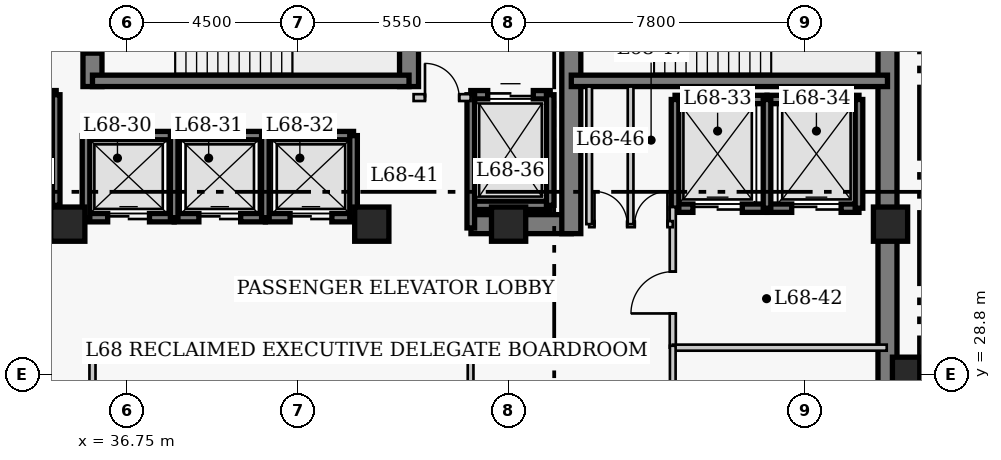
"""IFC4 building model, lengths in metres.
Left out: names, types, materials, properties, quantities, classifications, styles, units other than length and angle.
Written with IfcOpenShell. Run it as: python <this file> out.ifc"""

import sys

from ifc_helpers import new_model, si_unit, direction, frame, frame_2d, origin, origin_2d, place, context, subcontext, project, spatial, rectangle, extrude, element, fill, save


model = new_model("IFC4")
c1 = context("Model", 3, precision=1e-05, world=origin(), true_north=direction((0.0, 1.0)))
c2 = subcontext(c1, "Body", "Model", "MODEL_VIEW")
j1 = project(units=[si_unit("LENGTHUNIT", "METRE"), si_unit("PLANEANGLEUNIT", "RADIAN")], contexts=[c1])
p1 = place(None, origin())
s1 = spatial("IfcSite", under=j1, at=p1, CompositionType="ELEMENT")
p2 = place(p1, origin())
s2 = spatial("IfcBuilding", under=s1, at=p2, CompositionType="ELEMENT")
p3 = place(p2, frame((0.0, 0.0, 273.4)))
s3 = spatial("IfcBuildingStorey", under=s2, at=p3, CompositionType="ELEMENT", Elevation=273.4)
p4 = place(p3, frame((56.77, 27.05, 0.0), z_axis=(0.0, 0.0, 1.0), x_axis=(0.0, 1.0, 0.0)))
e1 = element("IfcWall", 1, at=p4, inside=s3, PredefinedType="SHEAR", context=c2, shape_type="SweptSolid", body=[
    extrude(rectangle(XDim=13.52, YDim=0.5, at=frame_2d((6.76, 0.0))), origin(), (0.0, 0.0, 1.0), 4.0),
])
p5 = place(p3, frame((45.81, 32.75, 0.0), z_axis=(0.0, 0.0, 1.0), x_axis=(1.0, 0.0, 0.0)))
e2 = element("IfcWall", 2, at=p5, inside=s3, PredefinedType="SHEAR", context=c2, shape_type="SweptSolid", body=[
    extrude(rectangle(XDim=2.64, YDim=0.5, at=frame_2d((1.32, 0.0))), origin(), (0.0, 0.0, 1.0), 4.0),
])
p6 = place(p3, frame((35.85, 36.37, 0.0), z_axis=(0.0, 0.0, 1.0), x_axis=(0.0, 1.0, 0.0)))
e3 = element("IfcWall", 3, at=p6, inside=s3, PredefinedType="SHEAR", context=c2, shape_type="SweptSolid", body=[
    extrude(rectangle(XDim=3.95, YDim=0.5, at=frame_2d((1.975, 0.0))), origin(), (0.0, 0.0, 1.0), 4.0),
])
p7 = place(p6, frame((0.88, 0.0, 0.0)))
e4 = element("IfcOpeningElement", 4, at=p7, cuts=e3, PredefinedType="OPENING", context=c2, shape_type="SweptSolid", body=[
    extrude(rectangle(XDim=1.1, YDim=2.15, at=frame_2d((0.55, 1.075))), frame((0.0, 0.26, 0.0), z_axis=(0.0, -1.0, 0.0), x_axis=(1.0, 0.0, 0.0)), (0.0, 0.0, 1.0), 0.52),
])
p8 = place(p3, frame((44.18, 36.37, 0.0), z_axis=(0.0, 0.0, 1.0), x_axis=(0.0, 1.0, 0.0)))
e5 = element("IfcWall", 5, at=p8, inside=s3, PredefinedType="SHEAR", context=c2, shape_type="SweptSolid", body=[
    extrude(rectangle(XDim=3.95, YDim=0.5, at=frame_2d((1.975, 0.0))), origin(), (0.0, 0.0, 1.0), 4.0),
])
p9 = place(p3, frame((48.45, 32.5, 0.0), z_axis=(0.0, 0.0, 1.0), x_axis=(0.0, 1.0, 0.0)))
e6 = element("IfcWall", 6, at=p9, inside=s3, PredefinedType="SHEAR", context=c2, shape_type="SweptSolid", body=[
    extrude(rectangle(XDim=7.82, YDim=0.5, at=frame_2d((3.91, 0.0))), origin(), (0.0, 0.0, 1.0), 4.0),
])
p10 = place(p9, frame((5.7, 0.0, 0.0)))
e7 = element("IfcOpeningElement", 7, at=p10, cuts=e6, PredefinedType="OPENING", context=c2, shape_type="SweptSolid", body=[
    extrude(rectangle(XDim=1.1, YDim=2.15, at=frame_2d((0.55, 1.075))), frame((0.0, 0.26, 0.0), z_axis=(0.0, -1.0, 0.0), x_axis=(1.0, 0.0, 0.0)), (0.0, 0.0, 1.0), 0.52),
])
p11 = place(p3, frame((35.85, 36.52, 0.0), z_axis=(0.0, 0.0, 1.0), x_axis=(1.0, 0.0, 0.0)))
e8 = element("IfcWall", 8, at=p11, inside=s3, PredefinedType="SHEAR", context=c2, shape_type="SweptSolid", body=[
    extrude(rectangle(XDim=8.33, YDim=0.3, at=frame_2d((4.165, 0.0))), origin(), (0.0, 0.0, 1.0), 4.0),
])
p12 = place(p3, frame((48.45, 36.52, 0.0), z_axis=(0.0, 0.0, 1.0), x_axis=(1.0, 0.0, 0.0)))
e9 = element("IfcWall", 9, at=p12, inside=s3, PredefinedType="SHEAR", context=c2, shape_type="SweptSolid", body=[
    extrude(rectangle(XDim=8.32, YDim=0.3, at=frame_2d((4.16, 0.0))), origin(), (0.0, 0.0, 1.0), 4.0),
])
for number, where, z_axis, x_axis in (
    (10, (57.35, 28.8, 0.0), (0.0, 0.0, 1.0), (1.0, 0.0, 0.0)),
    (11, (35.2, 32.75, 0.0), (0.0, 0.0, 1.0), (1.0, 0.0, 0.0)),
    (12, (43.2, 32.75, 0.0), (0.0, 0.0, 1.0), (1.0, 0.0, 0.0)),
    (13, (46.8, 32.75, 0.0), (0.0, 0.0, 1.0), (1.0, 0.0, 0.0)),
    (14, (56.85, 32.75, 0.0), (0.0, 0.0, 1.0), (1.0, 0.0, 0.0)),
):
    element("IfcColumn", number, at=place(p3, frame(where, z_axis=z_axis, x_axis=x_axis)), inside=s3, PredefinedType="COLUMN", context=c2, shape_type="SweptSolid", body=[
        extrude(rectangle(XDim=0.9, YDim=0.9, at=origin_2d()), origin(), (0.0, 0.0, 1.0), 4.0),
    ])
p13 = place(p3, frame((35.68, 35.08, 0.0), z_axis=(0.0, 0.0, 1.0), x_axis=(1.0, 0.0, 0.0)))
e15 = element("IfcWall", 15, at=p13, inside=s3, PredefinedType="SHEAR", context=c2, shape_type="SweptSolid", body=[
    extrude(rectangle(XDim=2.32, YDim=0.22, at=frame_2d((1.16, 0.0))), origin(), (0.0, 0.0, 1.0), 4.0),
])
p14 = place(p3, frame((35.68, 32.92, 0.0), z_axis=(0.0, 0.0, 1.0), x_axis=(1.0, 0.0, 0.0)))
e16 = element("IfcWall", 16, at=p14, inside=s3, PredefinedType="SHEAR", context=c2, shape_type="SweptSolid", body=[
    extrude(rectangle(XDim=2.32, YDim=0.22, at=frame_2d((1.16, 0.0))), origin(), (0.0, 0.0, 1.0), 4.0),
])
p15 = place(p14, frame((0.57, 0.0, 0.0)))
e17 = element("IfcOpeningElement", 17, at=p15, cuts=e16, PredefinedType="OPENING", context=c2, shape_type="SweptSolid", body=[
    extrude(rectangle(XDim=1.1, YDim=2.15, at=frame_2d((0.55, 1.075))), frame((0.0, 0.12, 0.0), z_axis=(0.0, -1.0, 0.0), x_axis=(1.0, 0.0, 0.0)), (0.0, 0.0, 1.0), 0.24),
])
p16 = place(p3, frame((35.68, 32.92, 0.0), z_axis=(0.0, 0.0, 1.0), x_axis=(0.0, 1.0, 0.0)))
e18 = element("IfcWall", 18, at=p16, inside=s3, PredefinedType="SHEAR", context=c2, shape_type="SweptSolid", body=[
    extrude(rectangle(XDim=2.16, YDim=0.2, at=frame_2d((1.08, 0.0))), origin(), (0.0, 0.0, 1.0), 4.0),
])
p17 = place(p3, frame((38.0, 35.08, 0.0), z_axis=(0.0, 0.0, 1.0), x_axis=(1.0, 0.0, 0.0)))
e19 = element("IfcWall", 19, at=p17, inside=s3, PredefinedType="SHEAR", context=c2, shape_type="SweptSolid", body=[
    extrude(rectangle(XDim=2.4, YDim=0.22, at=frame_2d((1.2, 0.0))), origin(), (0.0, 0.0, 1.0), 4.0),
])
p18 = place(p3, frame((38.0, 32.92, 0.0), z_axis=(0.0, 0.0, 1.0), x_axis=(1.0, 0.0, 0.0)))
e20 = element("IfcWall", 20, at=p18, inside=s3, PredefinedType="SHEAR", context=c2, shape_type="SweptSolid", body=[
    extrude(rectangle(XDim=2.4, YDim=0.22, at=frame_2d((1.2, 0.0))), origin(), (0.0, 0.0, 1.0), 4.0),
])
p19 = place(p18, frame((0.65, 0.0, 0.0)))
e21 = element("IfcOpeningElement", 21, at=p19, cuts=e20, PredefinedType="OPENING", context=c2, shape_type="SweptSolid", body=[
    extrude(rectangle(XDim=1.1, YDim=2.15, at=frame_2d((0.55, 1.075))), frame((0.0, 0.12, 0.0), z_axis=(0.0, -1.0, 0.0), x_axis=(1.0, 0.0, 0.0)), (0.0, 0.0, 1.0), 0.24),
])
p20 = place(p3, frame((38.0, 32.92, 0.0), z_axis=(0.0, 0.0, 1.0), x_axis=(0.0, 1.0, 0.0)))
e22 = element("IfcWall", 22, at=p20, inside=s3, PredefinedType="SHEAR", context=c2, shape_type="SweptSolid", body=[
    extrude(rectangle(XDim=2.16, YDim=0.2, at=frame_2d((1.08, 0.0))), origin(), (0.0, 0.0, 1.0), 4.0),
])
p21 = place(p3, frame((40.4, 35.08, 0.0), z_axis=(0.0, 0.0, 1.0), x_axis=(1.0, 0.0, 0.0)))
e23 = element("IfcWall", 23, at=p21, inside=s3, PredefinedType="SHEAR", context=c2, shape_type="SweptSolid", body=[
    extrude(rectangle(XDim=2.32, YDim=0.22, at=frame_2d((1.16, 0.0))), origin(), (0.0, 0.0, 1.0), 4.0),
])
p22 = place(p3, frame((40.4, 32.92, 0.0), z_axis=(0.0, 0.0, 1.0), x_axis=(1.0, 0.0, 0.0)))
e24 = element("IfcWall", 24, at=p22, inside=s3, PredefinedType="SHEAR", context=c2, shape_type="SweptSolid", body=[
    extrude(rectangle(XDim=2.32, YDim=0.22, at=frame_2d((1.16, 0.0))), origin(), (0.0, 0.0, 1.0), 4.0),
])
p23 = place(p22, frame((0.65, 0.0, 0.0)))
e25 = element("IfcOpeningElement", 25, at=p23, cuts=e24, PredefinedType="OPENING", context=c2, shape_type="SweptSolid", body=[
    extrude(rectangle(XDim=1.1, YDim=2.15, at=frame_2d((0.55, 1.075))), frame((0.0, 0.12, 0.0), z_axis=(0.0, -1.0, 0.0), x_axis=(1.0, 0.0, 0.0)), (0.0, 0.0, 1.0), 0.24),
])
for number, where, z_axis, x_axis in (
    (26, (40.4, 32.92, 0.0), (0.0, 0.0, 1.0), (0.0, 1.0, 0.0)),
    (27, (42.72, 32.92, 0.0), (0.0, 0.0, 1.0), (0.0, 1.0, 0.0)),
):
    element("IfcWall", number, at=place(p3, frame(where, z_axis=z_axis, x_axis=x_axis)), inside=s3, PredefinedType="SHEAR", context=c2, shape_type="SweptSolid", body=[
        extrude(rectangle(XDim=2.16, YDim=0.2, at=frame_2d((1.08, 0.0))), origin(), (0.0, 0.0, 1.0), 4.0),
    ])
p24 = place(p3, frame((51.18, 36.03, 0.0), z_axis=(0.0, 0.0, 1.0), x_axis=(1.0, 0.0, 0.0)))
e28 = element("IfcWall", 28, at=p24, inside=s3, PredefinedType="SHEAR", context=c2, shape_type="SweptSolid", body=[
    extrude(rectangle(XDim=2.42, YDim=0.22, at=frame_2d((1.21, 0.0))), origin(), (0.0, 0.0, 1.0), 4.0),
])
p25 = place(p3, frame((51.18, 33.17, 0.0), z_axis=(0.0, 0.0, 1.0), x_axis=(1.0, 0.0, 0.0)))
e29 = element("IfcWall", 29, at=p25, inside=s3, PredefinedType="SHEAR", context=c2, shape_type="SweptSolid", body=[
    extrude(rectangle(XDim=2.42, YDim=0.22, at=frame_2d((1.21, 0.0))), origin(), (0.0, 0.0, 1.0), 4.0),
])
p26 = place(p25, frame((0.47, 0.0, 0.0)))
e30 = element("IfcOpeningElement", 30, at=p26, cuts=e29, PredefinedType="OPENING", context=c2, shape_type="SweptSolid", body=[
    extrude(rectangle(XDim=1.3, YDim=2.15, at=frame_2d((0.65, 1.075))), frame((0.0, 0.12, 0.0), z_axis=(0.0, -1.0, 0.0), x_axis=(1.0, 0.0, 0.0)), (0.0, 0.0, 1.0), 0.24),
])
p27 = place(p3, frame((51.18, 33.17, 0.0), z_axis=(0.0, 0.0, 1.0), x_axis=(0.0, 1.0, 0.0)))
e31 = element("IfcWall", 31, at=p27, inside=s3, PredefinedType="SHEAR", context=c2, shape_type="SweptSolid", body=[
    extrude(rectangle(XDim=2.86, YDim=0.2, at=frame_2d((1.43, 0.0))), origin(), (0.0, 0.0, 1.0), 4.0),
])
p28 = place(p3, frame((53.6, 36.03, 0.0), z_axis=(0.0, 0.0, 1.0), x_axis=(1.0, 0.0, 0.0)))
e32 = element("IfcWall", 32, at=p28, inside=s3, PredefinedType="SHEAR", context=c2, shape_type="SweptSolid", body=[
    extrude(rectangle(XDim=2.42, YDim=0.22, at=frame_2d((1.21, 0.0))), origin(), (0.0, 0.0, 1.0), 4.0),
])
p29 = place(p3, frame((53.6, 33.17, 0.0), z_axis=(0.0, 0.0, 1.0), x_axis=(1.0, 0.0, 0.0)))
e33 = element("IfcWall", 33, at=p29, inside=s3, PredefinedType="SHEAR", context=c2, shape_type="SweptSolid", body=[
    extrude(rectangle(XDim=2.42, YDim=0.22, at=frame_2d((1.21, 0.0))), origin(), (0.0, 0.0, 1.0), 4.0),
])
p30 = place(p29, frame((0.65, 0.0, 0.0)))
e34 = element("IfcOpeningElement", 34, at=p30, cuts=e33, PredefinedType="OPENING", context=c2, shape_type="SweptSolid", body=[
    extrude(rectangle(XDim=1.3, YDim=2.15, at=frame_2d((0.65, 1.075))), frame((0.0, 0.12, 0.0), z_axis=(0.0, -1.0, 0.0), x_axis=(1.0, 0.0, 0.0)), (0.0, 0.0, 1.0), 0.24),
])
for number, where, z_axis, x_axis in (
    (35, (53.6, 33.17, 0.0), (0.0, 0.0, 1.0), (0.0, 1.0, 0.0)),
    (36, (56.02, 33.17, 0.0), (0.0, 0.0, 1.0), (0.0, 1.0, 0.0)),
):
    element("IfcWall", number, at=place(p3, frame(where, z_axis=z_axis, x_axis=x_axis)), inside=s3, PredefinedType="SHEAR", context=c2, shape_type="SweptSolid", body=[
        extrude(rectangle(XDim=2.86, YDim=0.2, at=frame_2d((1.43, 0.0))), origin(), (0.0, 0.0, 1.0), 4.0),
    ])
p31 = place(p3, frame((32.805, 36.155, 0.0), z_axis=(0.0, 0.0, 1.0), x_axis=(1.0, 0.0, 0.0)))
e37 = element("IfcWall", 37, at=p31, inside=s3, PredefinedType="SHEAR", context=c2, shape_type="SweptSolid", body=[
    extrude(rectangle(XDim=2.09, YDim=0.22, at=frame_2d((1.045, 0.0))), origin(), (0.0, 0.0, 1.0), 4.0),
])
p32 = place(p31, frame((0.445, 0.0, 0.0)))
e38 = element("IfcOpeningElement", 38, at=p32, cuts=e37, PredefinedType="OPENING", context=c2, shape_type="SweptSolid", body=[
    extrude(rectangle(XDim=1.2, YDim=2.15, at=frame_2d((0.6, 1.075))), frame((0.0, 0.12, 0.0), z_axis=(0.0, -1.0, 0.0), x_axis=(1.0, 0.0, 0.0)), (0.0, 0.0, 1.0), 0.24),
])
p33 = place(p3, frame((32.805, 33.245, 0.0), z_axis=(0.0, 0.0, 1.0), x_axis=(1.0, 0.0, 0.0)))
e39 = element("IfcWall", 39, at=p33, inside=s3, PredefinedType="SHEAR", context=c2, shape_type="SweptSolid", body=[
    extrude(rectangle(XDim=2.09, YDim=0.22, at=frame_2d((1.045, 0.0))), origin(), (0.0, 0.0, 1.0), 4.0),
])
p34 = place(p3, frame((34.895, 33.245, 0.0), z_axis=(0.0, 0.0, 1.0), x_axis=(0.0, 1.0, 0.0)))
e40 = element("IfcWall", 40, at=p34, inside=s3, PredefinedType="SHEAR", context=c2, shape_type="SweptSolid", body=[
    extrude(rectangle(XDim=2.91, YDim=0.2, at=frame_2d((1.455, 0.0))), origin(), (0.0, 0.0, 1.0), 4.0),
])
p35 = place(p3, frame((45.805, 36.155, 0.0), z_axis=(0.0, 0.0, 1.0), x_axis=(1.0, 0.0, 0.0)))
e41 = element("IfcWall", 41, at=p35, inside=s3, PredefinedType="SHEAR", context=c2, shape_type="SweptSolid", body=[
    extrude(rectangle(XDim=2.09, YDim=0.22, at=frame_2d((1.045, 0.0))), origin(), (0.0, 0.0, 1.0), 4.0),
])
p36 = place(p35, frame((0.445, 0.0, 0.0)))
e42 = element("IfcOpeningElement", 42, at=p36, cuts=e41, PredefinedType="OPENING", context=c2, shape_type="SweptSolid", body=[
    extrude(rectangle(XDim=1.2, YDim=2.15, at=frame_2d((0.6, 1.075))), frame((0.0, 0.12, 0.0), z_axis=(0.0, -1.0, 0.0), x_axis=(1.0, 0.0, 0.0)), (0.0, 0.0, 1.0), 0.24),
])
p37 = place(p3, frame((45.805, 33.245, 0.0), z_axis=(0.0, 0.0, 1.0), x_axis=(1.0, 0.0, 0.0)))
e43 = element("IfcWall", 43, at=p37, inside=s3, PredefinedType="SHEAR", context=c2, shape_type="SweptSolid", body=[
    extrude(rectangle(XDim=2.09, YDim=0.22, at=frame_2d((1.045, 0.0))), origin(), (0.0, 0.0, 1.0), 4.0),
])
p38 = place(p3, frame((45.805, 32.65, 0.0), z_axis=(0.0, 0.0, 1.0), x_axis=(0.0, 1.0, 0.0)))
e44 = element("IfcWall", 44, at=p38, inside=s3, PredefinedType="SHEAR", context=c2, shape_type="SweptSolid", body=[
    extrude(rectangle(XDim=3.505, YDim=0.2, at=frame_2d((1.752, 0.0))), origin(), (0.0, 0.0, 1.0), 4.0),
])
p39 = place(p3, frame((47.895, 33.245, 0.0), z_axis=(0.0, 0.0, 1.0), x_axis=(0.0, 1.0, 0.0)))
e45 = element("IfcWall", 45, at=p39, inside=s3, PredefinedType="SHEAR", context=c2, shape_type="SweptSolid", body=[
    extrude(rectangle(XDim=2.91, YDim=0.2, at=frame_2d((1.455, 0.0))), origin(), (0.0, 0.0, 1.0), 4.0),
])
p40 = place(p3, frame((44.3, 36.08, 0.0), z_axis=(0.0, 0.0, 1.0), x_axis=(1.0, 0.0, 0.0)))
e46 = element("IfcWall", 46, at=p40, inside=s3, PredefinedType="PARTITIONING", context=c2, shape_type="SweptSolid", body=[
    extrude(rectangle(XDim=1.5, YDim=0.18, at=frame_2d((0.75, 0.0))), origin(), (0.0, 0.0, 1.0), 3.76),
])
p41 = place(p40, frame((0.3, 0.0, 0.0)))
e47 = element("IfcOpeningElement", 47, at=p41, cuts=e46, PredefinedType="OPENING", context=c2, shape_type="SweptSolid", body=[
    extrude(rectangle(XDim=0.9, YDim=2.15, at=frame_2d((0.45, 1.075))), frame((0.0, 0.1, 0.0), z_axis=(0.0, -1.0, 0.0), x_axis=(1.0, 0.0, 0.0)), (0.0, 0.0, 1.0), 0.2),
])
p42 = place(p3, frame((51.12, 29.5, 0.0), z_axis=(0.0, 0.0, 1.0), x_axis=(0.0, 1.0, 0.0)))
e48 = element("IfcWall", 48, at=p42, inside=s3, PredefinedType="PARTITIONING", context=c2, shape_type="SweptSolid", body=[
    extrude(rectangle(XDim=3.7, YDim=0.16, at=frame_2d((1.85, 0.0))), origin(), (0.0, 0.0, 1.0), 3.76),
])
p43 = place(p42, frame((0.9, 0.0, 0.0)))
e49 = element("IfcOpeningElement", 49, at=p43, cuts=e48, PredefinedType="OPENING", context=c2, shape_type="SweptSolid", body=[
    extrude(rectangle(XDim=1.1, YDim=2.15, at=frame_2d((0.55, 1.075))), frame((0.0, 0.09, 0.0), z_axis=(0.0, -1.0, 0.0), x_axis=(1.0, 0.0, 0.0)), (0.0, 0.0, 1.0), 0.18),
])
p44 = place(p3, frame((51.12, 29.5, 0.0), z_axis=(0.0, 0.0, 1.0), x_axis=(1.0, 0.0, 0.0)))
e50 = element("IfcWall", 50, at=p44, inside=s3, PredefinedType="PARTITIONING", context=c2, shape_type="SweptSolid", body=[
    extrude(rectangle(XDim=5.63, YDim=0.16, at=frame_2d((2.815, 0.0))), origin(), (0.0, 0.0, 1.0), 3.76),
])
p45 = place(p3, frame((48.92, 32.75, 0.0), z_axis=(0.0, 0.0, 1.0), x_axis=(1.0, 0.0, 0.0)))
e51 = element("IfcWall", 51, at=p45, inside=s3, PredefinedType="PARTITIONING", context=c2, shape_type="SweptSolid", body=[
    extrude(rectangle(XDim=2.2, YDim=0.16, at=frame_2d((1.1, 0.0))), origin(), (0.0, 0.0, 1.0), 3.76),
])
p46 = place(p45, frame((0.14, 0.0, 0.0)))
e52 = element("IfcOpeningElement", 52, at=p46, cuts=e51, PredefinedType="OPENING", context=c2, shape_type="SweptSolid", body=[
    extrude(rectangle(XDim=0.86, YDim=2.05, at=frame_2d((0.43, 1.025))), frame((0.0, 0.09, 0.0), z_axis=(0.0, -1.0, 0.0), x_axis=(1.0, 0.0, 0.0)), (0.0, 0.0, 1.0), 0.18),
])
p47 = place(p45, frame((1.2, 0.0, 0.0)))
e53 = element("IfcOpeningElement", 53, at=p47, cuts=e51, PredefinedType="OPENING", context=c2, shape_type="SweptSolid", body=[
    extrude(rectangle(XDim=0.86, YDim=2.05, at=frame_2d((0.43, 1.025))), frame((0.0, 0.09, 0.0), z_axis=(0.0, -1.0, 0.0), x_axis=(1.0, 0.0, 0.0)), (0.0, 0.0, 1.0), 0.18),
])
for number, where, z_axis, x_axis in (
    (54, (48.92, 32.75, 0.0), (0.0, 0.0, 1.0), (0.0, 1.0, 0.0)),
    (55, (50.01, 32.75, 0.0), (0.0, 0.0, 1.0), (0.0, 1.0, 0.0)),
):
    element("IfcWall", number, at=place(p3, frame(where, z_axis=z_axis, x_axis=x_axis)), inside=s3, PredefinedType="PARTITIONING", context=c2, shape_type="SweptSolid", body=[
        extrude(rectangle(XDim=3.62, YDim=0.15, at=frame_2d((1.81, 0.0))), origin(), (0.0, 0.0, 1.0), 3.76),
    ])
p48 = place(p3, frame((35.85, 26.41, 0.0), z_axis=(0.0, 0.0, 1.0), x_axis=(0.0, 1.0, 0.0)))
e56 = element("IfcWall", 56, at=p48, inside=s3, PredefinedType="PARTITIONING", context=c2, shape_type="SweptSolid", body=[
    extrude(rectangle(XDim=3.14, YDim=0.16, at=frame_2d((1.57, 0.0))), origin(), (0.0, 0.0, 1.0), 3.76),
])
for number, where, z_axis, x_axis in (
    (57, (45.8, 26.41, 0.0), (0.0, 0.0, 1.0), (0.0, 1.0, 0.0)),
    (58, (51.12, 26.41, 0.0), (0.0, 0.0, 1.0), (0.0, 1.0, 0.0)),
):
    element("IfcWall", number, at=place(p3, frame(where, z_axis=z_axis, x_axis=x_axis)), inside=s3, PredefinedType="PARTITIONING", context=c2, shape_type="SweptSolid", body=[
        extrude(rectangle(XDim=3.14, YDim=0.15, at=frame_2d((1.57, 0.0))), origin(), (0.0, 0.0, 1.0), 3.76),
    ])
p49 = place(p15, origin())
e59 = element("IfcDoor", 59, at=p49, inside=s3, OperationType="DOUBLE_DOOR_SLIDING", PredefinedType="DOOR", context=c2, shape_type="SweptSolid", body=[
    extrude(rectangle(XDim=1.1, YDim=2.15, at=frame_2d((0.55, 1.075))), frame((0.0, 0.025, 0.0), z_axis=(0.0, -1.0, 0.0), x_axis=(1.0, 0.0, 0.0)), (0.0, 0.0, 1.0), 0.05),
])
fill(e17, e59)
p50 = place(p19, origin())
e60 = element("IfcDoor", 60, at=p50, inside=s3, OperationType="DOUBLE_DOOR_SLIDING", PredefinedType="DOOR", context=c2, shape_type="SweptSolid", body=[
    extrude(rectangle(XDim=1.1, YDim=2.15, at=frame_2d((0.55, 1.075))), frame((0.0, 0.025, 0.0), z_axis=(0.0, -1.0, 0.0), x_axis=(1.0, 0.0, 0.0)), (0.0, 0.0, 1.0), 0.05),
])
fill(e21, e60)
p51 = place(p23, origin())
e61 = element("IfcDoor", 61, at=p51, inside=s3, OperationType="DOUBLE_DOOR_SLIDING", PredefinedType="DOOR", context=c2, shape_type="SweptSolid", body=[
    extrude(rectangle(XDim=1.1, YDim=2.15, at=frame_2d((0.55, 1.075))), frame((0.0, 0.025, 0.0), z_axis=(0.0, -1.0, 0.0), x_axis=(1.0, 0.0, 0.0)), (0.0, 0.0, 1.0), 0.05),
])
fill(e25, e61)
p52 = place(p26, origin())
e62 = element("IfcDoor", 62, at=p52, inside=s3, OperationType="DOUBLE_DOOR_SLIDING", PredefinedType="DOOR", context=c2, shape_type="SweptSolid", body=[
    extrude(rectangle(XDim=1.3, YDim=2.15, at=frame_2d((0.65, 1.075))), frame((0.0, 0.025, 0.0), z_axis=(0.0, -1.0, 0.0), x_axis=(1.0, 0.0, 0.0)), (0.0, 0.0, 1.0), 0.05),
])
fill(e30, e62)
p53 = place(p30, origin())
e63 = element("IfcDoor", 63, at=p53, inside=s3, OperationType="DOUBLE_DOOR_SLIDING", PredefinedType="DOOR", context=c2, shape_type="SweptSolid", body=[
    extrude(rectangle(XDim=1.3, YDim=2.15, at=frame_2d((0.65, 1.075))), frame((0.0, 0.025, 0.0), z_axis=(0.0, -1.0, 0.0), x_axis=(1.0, 0.0, 0.0)), (0.0, 0.0, 1.0), 0.05),
])
fill(e34, e63)
p54 = place(p36, origin())
e64 = element("IfcDoor", 64, at=p54, inside=s3, OperationType="DOUBLE_DOOR_SLIDING", PredefinedType="DOOR", context=c2, shape_type="SweptSolid", body=[
    extrude(rectangle(XDim=1.2, YDim=2.15, at=frame_2d((0.6, 1.075))), frame((0.0, 0.025, 0.0), z_axis=(0.0, -1.0, 0.0), x_axis=(1.0, 0.0, 0.0)), (0.0, 0.0, 1.0), 0.05),
])
fill(e42, e64)
p55 = place(p41, origin())
e65 = element("IfcDoor", 65, at=p55, inside=s3, OperationType="SINGLE_SWING_LEFT", PredefinedType="DOOR", context=c2, shape_type="SweptSolid", body=[
    extrude(rectangle(XDim=0.9, YDim=2.15, at=frame_2d((0.45, 1.075))), frame((0.0, 0.025, 0.0), z_axis=(0.0, -1.0, 0.0), x_axis=(1.0, 0.0, 0.0)), (0.0, 0.0, 1.0), 0.05),
])
fill(e47, e65)
p56 = place(p43, origin())
e66 = element("IfcDoor", 66, at=p56, inside=s3, OperationType="SINGLE_SWING_LEFT", PredefinedType="DOOR", context=c2, shape_type="SweptSolid", body=[
    extrude(rectangle(XDim=1.1, YDim=2.15, at=frame_2d((0.55, 1.075))), frame((0.0, 0.025, 0.0), z_axis=(0.0, -1.0, 0.0), x_axis=(1.0, 0.0, 0.0)), (0.0, 0.0, 1.0), 0.05),
])
fill(e49, e66)
p57 = place(p46, origin())
e67 = element("IfcDoor", 67, at=p57, inside=s3, OperationType="SINGLE_SWING_LEFT", PredefinedType="DOOR", context=c2, shape_type="SweptSolid", body=[
    extrude(rectangle(XDim=0.86, YDim=2.05, at=frame_2d((0.43, 1.025))), frame((0.0, 0.025, 0.0), z_axis=(0.0, -1.0, 0.0), x_axis=(1.0, 0.0, 0.0)), (0.0, 0.0, 1.0), 0.05),
])
fill(e52, e67)
p58 = place(p47, origin())
e68 = element("IfcDoor", 68, at=p58, inside=s3, OperationType="SINGLE_SWING_RIGHT", PredefinedType="DOOR", context=c2, shape_type="SweptSolid", body=[
    extrude(rectangle(XDim=0.86, YDim=2.05, at=frame_2d((0.43, 1.025))), frame((0.0, 0.025, 0.0), z_axis=(0.0, -1.0, 0.0), x_axis=(1.0, 0.0, 0.0)), (0.0, 0.0, 1.0), 0.05),
])
fill(e53, e68)
p59 = place(p7, origin())
e69 = element("IfcDoor", 69, at=p59, inside=s3, OperationType="SINGLE_SWING_RIGHT", PredefinedType="DOOR", context=c2, shape_type="SweptSolid", body=[
    extrude(rectangle(XDim=1.1, YDim=2.15, at=frame_2d((0.55, 1.075))), frame((0.0, 0.025, 0.0), z_axis=(0.0, -1.0, 0.0), x_axis=(1.0, 0.0, 0.0)), (0.0, 0.0, 1.0), 0.05),
])
fill(e4, e69)
save(model, sys.argv[1])
